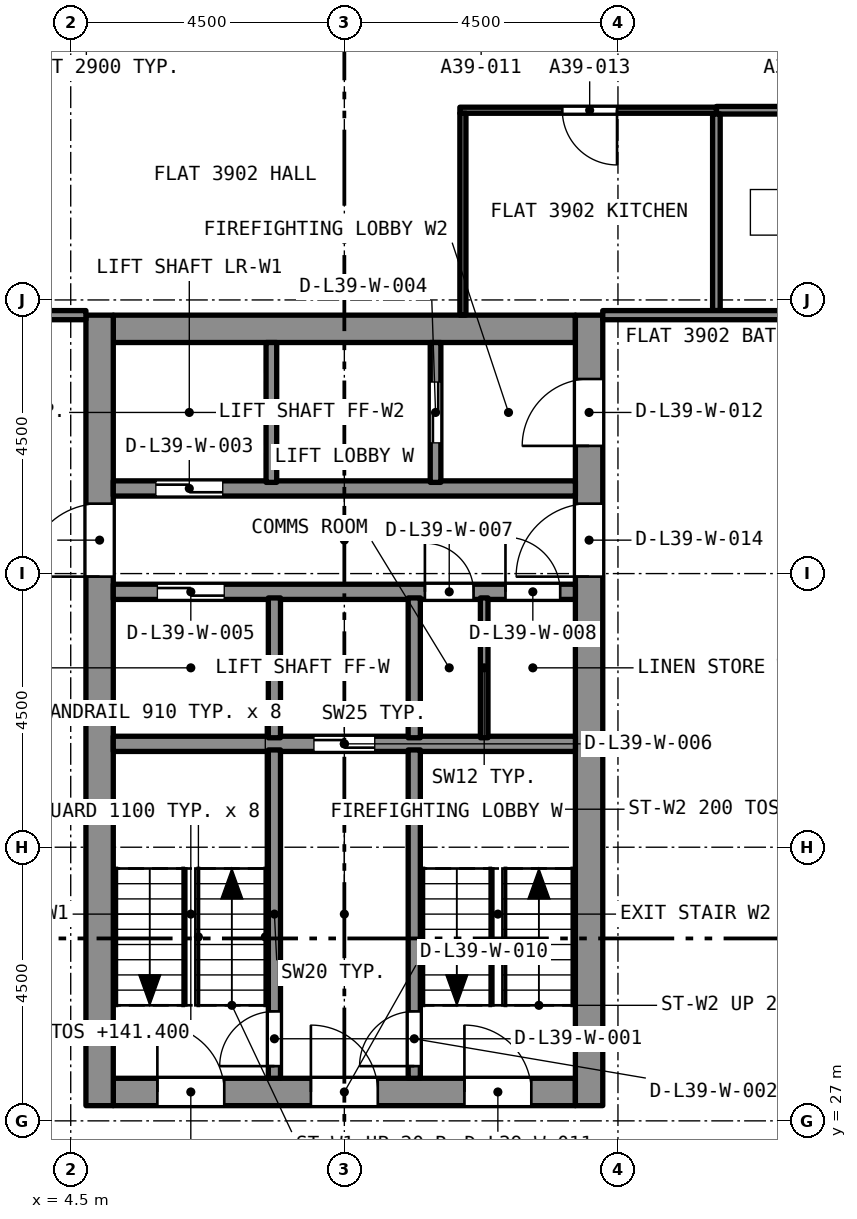
"""IFC4 building model, lengths in metres.
Left out: names, types, materials, properties, quantities, classifications, styles, units other than length and angle.
Written with IfcOpenShell. Run it as: python <this file> out.ifc"""

import sys

from ifc_helpers import new_model, si_unit, direction, frame, frame_2d, origin, place, context, subcontext, project, spatial, rectangle, extrude, element, fill, save


model = new_model("IFC4")
c1 = context("Model", 3, precision=1e-05, world=origin(), true_north=direction((0.0, 1.0)))
c2 = subcontext(c1, "Body", "Model", "MODEL_VIEW")
j1 = project(units=[si_unit("LENGTHUNIT", "METRE"), si_unit("PLANEANGLEUNIT", "RADIAN")], contexts=[c1])
p1 = place(None, origin())
s1 = spatial("IfcSite", under=j1, at=p1, CompositionType="ELEMENT")
p2 = place(p1, origin())
s2 = spatial("IfcBuilding", under=s1, at=p2, CompositionType="ELEMENT")
p3 = place(p2, frame((0.0, 0.0, 139.8)))
s3 = spatial("IfcBuildingStorey", under=s2, at=p3, CompositionType="ELEMENT", Elevation=139.8)
p4 = place(p3, frame((5.2, 27.475, 0.0), z_axis=(0.0, 0.0, 1.0), x_axis=(1.0, 0.0, 0.0)))
e1 = element("IfcWall", 1, at=p4, inside=s3, PredefinedType="SOLIDWALL", context=c2, shape_type="SweptSolid", body=[
    extrude(rectangle(XDim=7.6, YDim=0.45, at=frame_2d((3.8, 0.0))), origin(), (0.0, 0.0, 1.0), 3.2),
])
p5 = place(p4, frame((0.725, 0.0, 0.0)))
e2 = element("IfcOpeningElement", 2, at=p5, cuts=e1, PredefinedType="OPENING", context=c2, shape_type="SweptSolid", body=[
    extrude(rectangle(XDim=1.1, YDim=2.1, at=frame_2d((0.55, 1.05))), frame((0.0, 0.235, 0.0), z_axis=(0.0, -1.0, 0.0), x_axis=(1.0, 0.0, 0.0)), (0.0, 0.0, 1.0), 0.47),
])
p6 = place(p4, frame((3.25, 0.0, 0.0)))
e3 = element("IfcOpeningElement", 3, at=p6, cuts=e1, PredefinedType="OPENING", context=c2, shape_type="SweptSolid", body=[
    extrude(rectangle(XDim=1.1, YDim=2.1, at=frame_2d((0.55, 1.05))), frame((0.0, 0.235, 0.0), z_axis=(0.0, -1.0, 0.0), x_axis=(1.0, 0.0, 0.0)), (0.0, 0.0, 1.0), 0.47),
])
p7 = place(p4, frame((5.775, 0.0, 0.0)))
e4 = element("IfcOpeningElement", 4, at=p7, cuts=e1, PredefinedType="OPENING", context=c2, shape_type="SweptSolid", body=[
    extrude(rectangle(XDim=1.1, YDim=2.1, at=frame_2d((0.55, 1.05))), frame((0.0, 0.235, 0.0), z_axis=(0.0, -1.0, 0.0), x_axis=(1.0, 0.0, 0.0)), (0.0, 0.0, 1.0), 0.47),
])
p8 = place(p3, frame((5.2, 40.025, 0.0), z_axis=(0.0, 0.0, 1.0), x_axis=(1.0, 0.0, 0.0)))
e5 = element("IfcWall", 5, at=p8, inside=s3, PredefinedType="SOLIDWALL", context=c2, shape_type="SweptSolid", body=[
    extrude(rectangle(XDim=7.6, YDim=0.45, at=frame_2d((3.8, 0.0))), origin(), (0.0, 0.0, 1.0), 3.2),
])
p9 = place(p3, frame((4.975, 27.25, 0.0), z_axis=(0.0, 0.0, 1.0), x_axis=(0.0, 1.0, 0.0)))
e6 = element("IfcWall", 6, at=p9, inside=s3, PredefinedType="SOLIDWALL", context=c2, shape_type="SweptSolid", body=[
    extrude(rectangle(XDim=13.0, YDim=0.45, at=frame_2d((6.5, 0.0))), origin(), (0.0, 0.0, 1.0), 3.2),
])
p10 = place(p9, frame((8.7, 0.0, 0.0)))
e7 = element("IfcOpeningElement", 7, at=p10, cuts=e6, PredefinedType="OPENING", context=c2, shape_type="SweptSolid", body=[
    extrude(rectangle(XDim=1.2, YDim=2.1, at=frame_2d((0.6, 1.05))), frame((0.0, 0.235, 0.0), z_axis=(0.0, -1.0, 0.0), x_axis=(1.0, 0.0, 0.0)), (0.0, 0.0, 1.0), 0.47),
])
p11 = place(p3, frame((13.025, 27.25, 0.0), z_axis=(0.0, 0.0, 1.0), x_axis=(0.0, 1.0, 0.0)))
e8 = element("IfcWall", 8, at=p11, inside=s3, PredefinedType="SOLIDWALL", context=c2, shape_type="SweptSolid", body=[
    extrude(rectangle(XDim=13.0, YDim=0.45, at=frame_2d((6.5, 0.0))), origin(), (0.0, 0.0, 1.0), 3.2),
])
p12 = place(p11, frame((10.85, 0.0, 0.0)))
e9 = element("IfcOpeningElement", 9, at=p12, cuts=e8, PredefinedType="OPENING", context=c2, shape_type="SweptSolid", body=[
    extrude(rectangle(XDim=1.1, YDim=2.1, at=frame_2d((0.55, 1.05))), frame((0.0, 0.235, 0.0), z_axis=(0.0, -1.0, 0.0), x_axis=(1.0, 0.0, 0.0)), (0.0, 0.0, 1.0), 0.47),
])
p13 = place(p11, frame((8.7, 0.0, 0.0)))
e10 = element("IfcOpeningElement", 10, at=p13, cuts=e8, PredefinedType="OPENING", context=c2, shape_type="SweptSolid", body=[
    extrude(rectangle(XDim=1.2, YDim=2.1, at=frame_2d((0.6, 1.05))), frame((0.0, 0.235, 0.0), z_axis=(0.0, -1.0, 0.0), x_axis=(1.0, 0.0, 0.0)), (0.0, 0.0, 1.0), 0.47),
])
p14 = place(p3, frame((17.875, 43.62, 0.0), z_axis=(0.0, 0.0, 1.0), x_axis=(-1.0, 0.0, 0.0)))
e11 = element("IfcWall", 11, at=p14, inside=s3, PredefinedType="PARTITIONING", context=c2, shape_type="SweptSolid", body=[
    extrude(rectangle(XDim=2.756, YDim=0.125, at=frame_2d((1.378, 0.0))), origin(), (0.0, 0.0, 1.0), 2.9),
])
p15 = place(p14, frame((0.915, 0.0, 0.0)))
e12 = element("IfcOpeningElement", 12, at=p15, cuts=e11, PredefinedType="OPENING", context=c2, shape_type="SweptSolid", body=[
    extrude(rectangle(XDim=0.8, YDim=2.1, at=frame_2d((0.4, 1.05))), frame((0.0, 0.073, 0.0), z_axis=(0.0, -1.0, 0.0), x_axis=(1.0, 0.0, 0.0)), (0.0, 0.0, 1.0), 0.145),
])
p16 = place(p3, frame((15.119, 40.325, 0.0), z_axis=(0.0, 0.0, 1.0), x_axis=(0.0, 1.0, 0.0)))
e13 = element("IfcWall", 13, at=p16, inside=s3, PredefinedType="PARTITIONING", context=c2, shape_type="SweptSolid", body=[
    extrude(rectangle(XDim=3.233, YDim=0.125, at=frame_2d((1.616, 0.0))), origin(), (0.0, 0.0, 1.0), 2.9),
])
p17 = place(p3, frame((15.119, 43.62, 0.0), z_axis=(0.0, 0.0, 1.0), x_axis=(-1.0, 0.0, 0.0)))
e14 = element("IfcWall", 14, at=p17, inside=s3, PredefinedType="PARTITIONING", context=c2, shape_type="SweptSolid", body=[
    extrude(rectangle(XDim=4.219, YDim=0.1, at=frame_2d((2.11, 0.0))), origin(), (0.0, 0.0, 1.0), 2.9),
])
p18 = place(p17, frame((1.635, 0.0, 0.0)))
e15 = element("IfcOpeningElement", 15, at=p18, cuts=e14, PredefinedType="OPENING", context=c2, shape_type="SweptSolid", body=[
    extrude(rectangle(XDim=0.9, YDim=2.1, at=frame_2d((0.45, 1.05))), frame((0.0, 0.06, 0.0), z_axis=(0.0, -1.0, 0.0), x_axis=(1.0, 0.0, 0.0)), (0.0, 0.0, 1.0), 0.12),
])
p19 = place(p3, frame((10.95, 40.25, 0.0), z_axis=(0.0, 0.0, 1.0), x_axis=(0.0, 1.0, 0.0)))
e16 = element("IfcWall", 16, at=p19, inside=s3, PredefinedType="PARTITIONING", context=c2, shape_type="SweptSolid", body=[
    extrude(rectangle(XDim=3.32, YDim=0.1, at=frame_2d((1.66, 0.0))), origin(), (0.0, 0.0, 1.0), 2.9),
])
p20 = place(p3, frame((0.475, 40.25, 0.0), z_axis=(0.0, 0.0, 1.0), x_axis=(1.0, 0.0, 0.0)))
e17 = element("IfcWall", 17, at=p20, inside=s3, PredefinedType="PARTITIONING", context=c2, shape_type="SweptSolid", body=[
    extrude(rectangle(XDim=4.275, YDim=0.15, at=frame_2d((2.137, 0.0))), origin(), (0.0, 0.0, 1.0), 2.9),
])
p21 = place(p20, frame((1.275, 0.0, 0.0)))
e18 = element("IfcOpeningElement", 18, at=p21, cuts=e17, PredefinedType="OPENING", context=c2, shape_type="SweptSolid", body=[
    extrude(rectangle(XDim=1.0, YDim=2.1, at=frame_2d((0.5, 1.05))), frame((0.0, 0.085, 0.0), z_axis=(0.0, -1.0, 0.0), x_axis=(1.0, 0.0, 0.0)), (0.0, 0.0, 1.0), 0.17),
])
p22 = place(p3, frame((13.25, 40.25, 0.0), z_axis=(0.0, 0.0, 1.0), x_axis=(1.0, 0.0, 0.0)))
e19 = element("IfcWall", 19, at=p22, inside=s3, PredefinedType="PARTITIONING", context=c2, shape_type="SweptSolid", body=[
    extrude(rectangle(XDim=4.275, YDim=0.15, at=frame_2d((2.137, 0.0))), origin(), (0.0, 0.0, 1.0), 2.9),
])
p23 = place(p3, frame((5.2, 33.2, 0.0), z_axis=(0.0, 0.0, 1.0), x_axis=(1.0, 0.0, 0.0)))
e20 = element("IfcWall", 20, at=p23, inside=s3, PredefinedType="SOLIDWALL", context=c2, shape_type="SweptSolid", body=[
    extrude(rectangle(XDim=7.6, YDim=0.25, at=frame_2d((3.8, 0.0))), origin(), (0.0, 0.0, 1.0), 2.9),
])
p24 = place(p23, frame((3.3, 0.0, 0.0)))
e21 = element("IfcOpeningElement", 21, at=p24, cuts=e20, PredefinedType="OPENING", context=c2, shape_type="SweptSolid", body=[
    extrude(rectangle(XDim=1.0, YDim=2.1, at=frame_2d((0.5, 1.05))), frame((0.0, 0.135, 0.0), z_axis=(0.0, -1.0, 0.0), x_axis=(1.0, 0.0, 0.0)), (0.0, 0.0, 1.0), 0.27),
])
p25 = place(p3, frame((5.2, 35.7, 0.0), z_axis=(0.0, 0.0, 1.0), x_axis=(1.0, 0.0, 0.0)))
e22 = element("IfcWall", 22, at=p25, inside=s3, PredefinedType="SOLIDWALL", context=c2, shape_type="SweptSolid", body=[
    extrude(rectangle(XDim=7.6, YDim=0.25, at=frame_2d((3.8, 0.0))), origin(), (0.0, 0.0, 1.0), 2.9),
])
p26 = place(p25, frame((0.725, 0.0, 0.0)))
e23 = element("IfcOpeningElement", 23, at=p26, cuts=e22, PredefinedType="OPENING", context=c2, shape_type="SweptSolid", body=[
    extrude(rectangle(XDim=1.1, YDim=2.4, at=frame_2d((0.55, 1.2))), frame((0.0, 0.135, 0.0), z_axis=(0.0, -1.0, 0.0), x_axis=(1.0, 0.0, 0.0)), (0.0, 0.0, 1.0), 0.27),
])
p27 = place(p25, frame((5.125, 0.0, 0.0)))
e24 = element("IfcOpeningElement", 24, at=p27, cuts=e22, PredefinedType="OPENING", context=c2, shape_type="SweptSolid", body=[
    extrude(rectangle(XDim=0.8, YDim=2.1, at=frame_2d((0.4, 1.05))), frame((0.0, 0.135, 0.0), z_axis=(0.0, -1.0, 0.0), x_axis=(1.0, 0.0, 0.0)), (0.0, 0.0, 1.0), 0.27),
])
p28 = place(p25, frame((6.45, 0.0, 0.0)))
e25 = element("IfcOpeningElement", 25, at=p28, cuts=e22, PredefinedType="OPENING", context=c2, shape_type="SweptSolid", body=[
    extrude(rectangle(XDim=0.9, YDim=2.1, at=frame_2d((0.45, 1.05))), frame((0.0, 0.135, 0.0), z_axis=(0.0, -1.0, 0.0), x_axis=(1.0, 0.0, 0.0)), (0.0, 0.0, 1.0), 0.27),
])
p29 = place(p3, frame((5.2, 37.4, 0.0), z_axis=(0.0, 0.0, 1.0), x_axis=(1.0, 0.0, 0.0)))
e26 = element("IfcWall", 26, at=p29, inside=s3, PredefinedType="SOLIDWALL", context=c2, shape_type="SweptSolid", body=[
    extrude(rectangle(XDim=7.6, YDim=0.25, at=frame_2d((3.8, 0.0))), origin(), (0.0, 0.0, 1.0), 2.9),
])
p30 = place(p29, frame((0.7, 0.0, 0.0)))
e27 = element("IfcOpeningElement", 27, at=p30, cuts=e26, PredefinedType="OPENING", context=c2, shape_type="SweptSolid", body=[
    extrude(rectangle(XDim=1.1, YDim=2.4, at=frame_2d((0.55, 1.2))), frame((0.0, 0.135, 0.0), z_axis=(0.0, -1.0, 0.0), x_axis=(1.0, 0.0, 0.0)), (0.0, 0.0, 1.0), 0.27),
])
p31 = place(p3, frame((7.85, 27.7, 0.0), z_axis=(0.0, 0.0, 1.0), x_axis=(0.0, 1.0, 0.0)))
e28 = element("IfcWall", 28, at=p31, inside=s3, PredefinedType="SOLIDWALL", context=c2, shape_type="SweptSolid", body=[
    extrude(rectangle(XDim=5.4, YDim=0.2, at=frame_2d((2.7, 0.0))), origin(), (0.0, 0.0, 1.0), 2.9),
])
p32 = place(p31, frame((0.2, 0.0, 0.0)))
e29 = element("IfcOpeningElement", 29, at=p32, cuts=e28, PredefinedType="OPENING", context=c2, shape_type="SweptSolid", body=[
    extrude(rectangle(XDim=0.9, YDim=2.1, at=frame_2d((0.45, 1.05))), frame((0.0, 0.11, 0.0), z_axis=(0.0, -1.0, 0.0), x_axis=(1.0, 0.0, 0.0)), (0.0, 0.0, 1.0), 0.22),
])
p33 = place(p3, frame((10.15, 27.7, 0.0), z_axis=(0.0, 0.0, 1.0), x_axis=(0.0, 1.0, 0.0)))
e30 = element("IfcWall", 30, at=p33, inside=s3, PredefinedType="SOLIDWALL", context=c2, shape_type="SweptSolid", body=[
    extrude(rectangle(XDim=5.4, YDim=0.2, at=frame_2d((2.7, 0.0))), origin(), (0.0, 0.0, 1.0), 2.9),
])
p34 = place(p33, frame((0.2, 0.0, 0.0)))
e31 = element("IfcOpeningElement", 31, at=p34, cuts=e30, PredefinedType="OPENING", context=c2, shape_type="SweptSolid", body=[
    extrude(rectangle(XDim=0.9, YDim=2.1, at=frame_2d((0.45, 1.05))), frame((0.0, 0.11, 0.0), z_axis=(0.0, -1.0, 0.0), x_axis=(1.0, 0.0, 0.0)), (0.0, 0.0, 1.0), 0.22),
])
for number, where, z_axis, x_axis in (
    (32, (7.85, 33.3, 0.0), (0.0, 0.0, 1.0), (0.0, 1.0, 0.0)),
    (33, (10.15, 33.3, 0.0), (0.0, 0.0, 1.0), (0.0, 1.0, 0.0)),
):
    element("IfcWall", number, at=place(p3, frame(where, z_axis=z_axis, x_axis=x_axis)), inside=s3, PredefinedType="SOLIDWALL", context=c2, shape_type="SweptSolid", body=[
        extrude(rectangle(XDim=2.3, YDim=0.2, at=frame_2d((1.15, 0.0))), origin(), (0.0, 0.0, 1.0), 2.9),
    ])
p35 = place(p3, frame((7.8, 37.5, 0.0), z_axis=(0.0, 0.0, 1.0), x_axis=(0.0, 1.0, 0.0)))
e34 = element("IfcWall", 34, at=p35, inside=s3, PredefinedType="SOLIDWALL", context=c2, shape_type="SweptSolid", body=[
    extrude(rectangle(XDim=2.3, YDim=0.175, at=frame_2d((1.15, 0.0))), origin(), (0.0, 0.0, 1.0), 2.9),
])
p36 = place(p3, frame((10.5, 37.5, 0.0), z_axis=(0.0, 0.0, 1.0), x_axis=(0.0, 1.0, 0.0)))
e35 = element("IfcWall", 35, at=p36, inside=s3, PredefinedType="SOLIDWALL", context=c2, shape_type="SweptSolid", body=[
    extrude(rectangle(XDim=2.3, YDim=0.175, at=frame_2d((1.15, 0.0))), origin(), (0.0, 0.0, 1.0), 2.9),
])
p37 = place(p36, frame((0.65, 0.0, 0.0)))
e36 = element("IfcOpeningElement", 36, at=p37, cuts=e35, PredefinedType="OPENING", context=c2, shape_type="SweptSolid", body=[
    extrude(rectangle(XDim=1.0, YDim=2.1, at=frame_2d((0.5, 1.05))), frame((0.0, 0.097, 0.0), z_axis=(0.0, -1.0, 0.0), x_axis=(1.0, 0.0, 0.0)), (0.0, 0.0, 1.0), 0.195),
])
p38 = place(p3, frame((11.3, 33.3, 0.0), z_axis=(0.0, 0.0, 1.0), x_axis=(0.0, 1.0, 0.0)))
e37 = element("IfcWall", 37, at=p38, inside=s3, PredefinedType="PARTITIONING", context=c2, shape_type="SweptSolid", body=[
    extrude(rectangle(XDim=2.3, YDim=0.125, at=frame_2d((1.15, 0.0))), origin(), (0.0, 0.0, 1.0), 2.9),
])
p39 = place(p18, origin())
e38 = element("IfcDoor", 38, at=p39, inside=s3, OperationType="SINGLE_SWING_LEFT", PredefinedType="DOOR", context=c2, shape_type="SweptSolid", body=[
    extrude(rectangle(XDim=0.9, YDim=2.1, at=frame_2d((0.45, 1.05))), frame((0.0, 0.025, 0.0), z_axis=(0.0, -1.0, 0.0), x_axis=(1.0, 0.0, 0.0)), (0.0, 0.0, 1.0), 0.05),
])
fill(e15, e38)
p40 = place(p32, origin())
e39 = element("IfcDoor", 39, at=p40, inside=s3, OperationType="SINGLE_SWING_LEFT", PredefinedType="DOOR", context=c2, shape_type="SweptSolid", body=[
    extrude(rectangle(XDim=0.9, YDim=2.1, at=frame_2d((0.45, 1.05))), frame((0.0, 0.025, 0.0), z_axis=(0.0, -1.0, 0.0), x_axis=(1.0, 0.0, 0.0)), (0.0, 0.0, 1.0), 0.05),
])
fill(e29, e39)
p41 = place(p34, origin())
e40 = element("IfcDoor", 40, at=p41, inside=s3, OperationType="SINGLE_SWING_LEFT", PredefinedType="DOOR", context=c2, shape_type="SweptSolid", body=[
    extrude(rectangle(XDim=0.9, YDim=2.1, at=frame_2d((0.45, 1.05))), frame((0.0, 0.025, 0.0), z_axis=(0.0, -1.0, 0.0), x_axis=(1.0, 0.0, 0.0)), (0.0, 0.0, 1.0), 0.05),
])
fill(e31, e40)
p42 = place(p30, origin())
e41 = element("IfcDoor", 41, at=p42, inside=s3, OperationType="SLIDING_TO_LEFT", PredefinedType="DOOR", context=c2, shape_type="SweptSolid", body=[
    extrude(rectangle(XDim=1.1, YDim=2.4, at=frame_2d((0.55, 1.2))), frame((0.0, 0.025, 0.0), z_axis=(0.0, -1.0, 0.0), x_axis=(1.0, 0.0, 0.0)), (0.0, 0.0, 1.0), 0.05),
])
fill(e27, e41)
p43 = place(p37, origin())
e42 = element("IfcDoor", 42, at=p43, inside=s3, OperationType="SLIDING_TO_LEFT", PredefinedType="DOOR", context=c2, shape_type="SweptSolid", body=[
    extrude(rectangle(XDim=1.0, YDim=2.1, at=frame_2d((0.5, 1.05))), frame((0.0, 0.025, 0.0), z_axis=(0.0, -1.0, 0.0), x_axis=(1.0, 0.0, 0.0)), (0.0, 0.0, 1.0), 0.05),
])
fill(e36, e42)
p44 = place(p26, origin())
e43 = element("IfcDoor", 43, at=p44, inside=s3, OperationType="SLIDING_TO_LEFT", PredefinedType="DOOR", context=c2, shape_type="SweptSolid", body=[
    extrude(rectangle(XDim=1.1, YDim=2.4, at=frame_2d((0.55, 1.2))), frame((0.0, 0.025, 0.0), z_axis=(0.0, -1.0, 0.0), x_axis=(1.0, 0.0, 0.0)), (0.0, 0.0, 1.0), 0.05),
])
fill(e23, e43)
p45 = place(p24, origin())
e44 = element("IfcDoor", 44, at=p45, inside=s3, OperationType="SLIDING_TO_LEFT", PredefinedType="DOOR", context=c2, shape_type="SweptSolid", body=[
    extrude(rectangle(XDim=1.0, YDim=2.1, at=frame_2d((0.5, 1.05))), frame((0.0, 0.025, 0.0), z_axis=(0.0, -1.0, 0.0), x_axis=(1.0, 0.0, 0.0)), (0.0, 0.0, 1.0), 0.05),
])
fill(e21, e44)
p46 = place(p27, origin())
e45 = element("IfcDoor", 45, at=p46, inside=s3, OperationType="SINGLE_SWING_LEFT", PredefinedType="DOOR", context=c2, shape_type="SweptSolid", body=[
    extrude(rectangle(XDim=0.8, YDim=2.1, at=frame_2d((0.4, 1.05))), frame((0.0, 0.025, 0.0), z_axis=(0.0, -1.0, 0.0), x_axis=(1.0, 0.0, 0.0)), (0.0, 0.0, 1.0), 0.05),
])
fill(e24, e45)
p47 = place(p28, origin())
e46 = element("IfcDoor", 46, at=p47, inside=s3, OperationType="SINGLE_SWING_LEFT", PredefinedType="DOOR", context=c2, shape_type="SweptSolid", body=[
    extrude(rectangle(XDim=0.9, YDim=2.1, at=frame_2d((0.45, 1.05))), frame((0.0, 0.025, 0.0), z_axis=(0.0, -1.0, 0.0), x_axis=(1.0, 0.0, 0.0)), (0.0, 0.0, 1.0), 0.05),
])
fill(e25, e46)
p48 = place(p5, origin())
e47 = element("IfcDoor", 47, at=p48, inside=s3, OperationType="SINGLE_SWING_LEFT", PredefinedType="DOOR", context=c2, shape_type="SweptSolid", body=[
    extrude(rectangle(XDim=1.1, YDim=2.1, at=frame_2d((0.55, 1.05))), frame((0.0, 0.025, 0.0), z_axis=(0.0, -1.0, 0.0), x_axis=(1.0, 0.0, 0.0)), (0.0, 0.0, 1.0), 0.05),
])
fill(e2, e47)
p49 = place(p6, origin())
e48 = element("IfcDoor", 48, at=p49, inside=s3, OperationType="SINGLE_SWING_LEFT", PredefinedType="DOOR", context=c2, shape_type="SweptSolid", body=[
    extrude(rectangle(XDim=1.1, YDim=2.1, at=frame_2d((0.55, 1.05))), frame((0.0, 0.025, 0.0), z_axis=(0.0, -1.0, 0.0), x_axis=(1.0, 0.0, 0.0)), (0.0, 0.0, 1.0), 0.05),
])
fill(e3, e48)
p50 = place(p7, origin())
e49 = element("IfcDoor", 49, at=p50, inside=s3, OperationType="SINGLE_SWING_LEFT", PredefinedType="DOOR", context=c2, shape_type="SweptSolid", body=[
    extrude(rectangle(XDim=1.1, YDim=2.1, at=frame_2d((0.55, 1.05))), frame((0.0, 0.025, 0.0), z_axis=(0.0, -1.0, 0.0), x_axis=(1.0, 0.0, 0.0)), (0.0, 0.0, 1.0), 0.05),
])
fill(e4, e49)
p51 = place(p12, origin())
e50 = element("IfcDoor", 50, at=p51, inside=s3, OperationType="SINGLE_SWING_LEFT", PredefinedType="DOOR", context=c2, shape_type="SweptSolid", body=[
    extrude(rectangle(XDim=1.1, YDim=2.1, at=frame_2d((0.55, 1.05))), frame((0.0, 0.025, 0.0), z_axis=(0.0, -1.0, 0.0), x_axis=(1.0, 0.0, 0.0)), (0.0, 0.0, 1.0), 0.05),
])
fill(e9, e50)
p52 = place(p10, origin())
e51 = element("IfcDoor", 51, at=p52, inside=s3, OperationType="SINGLE_SWING_LEFT", PredefinedType="DOOR", context=c2, shape_type="SweptSolid", body=[
    extrude(rectangle(XDim=1.2, YDim=2.1, at=frame_2d((0.6, 1.05))), frame((0.0, 0.025, 0.0), z_axis=(0.0, -1.0, 0.0), x_axis=(1.0, 0.0, 0.0)), (0.0, 0.0, 1.0), 0.05),
])
fill(e7, e51)
p53 = place(p13, origin())
e52 = element("IfcDoor", 52, at=p53, inside=s3, OperationType="SINGLE_SWING_LEFT", PredefinedType="DOOR", context=c2, shape_type="SweptSolid", body=[
    extrude(rectangle(XDim=1.2, YDim=2.1, at=frame_2d((0.6, 1.05))), frame((0.0, 0.025, 0.0), z_axis=(0.0, -1.0, 0.0), x_axis=(1.0, 0.0, 0.0)), (0.0, 0.0, 1.0), 0.05),
])
fill(e10, e52)
save(model, sys.argv[1])
